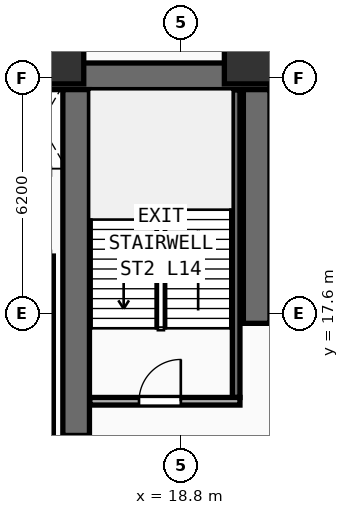
"""IFC4 building model, lengths in metres.
Left out: names, types, materials, properties, quantities, classifications, styles, units other than length and angle.
Written with IfcOpenShell. Run it as: python <this file> out.ifc"""

import sys

from ifc_helpers import new_model, si_unit, direction, frame, frame_2d, origin, origin_2d, place, context, subcontext, project, spatial, rectangle, extrude, element, fill, save


model = new_model("IFC4")
c1 = context("Model", 3, precision=1e-05, world=origin(), true_north=direction((0.0, 1.0)))
c2 = subcontext(c1, "Body", "Model", "MODEL_VIEW")
j1 = project(units=[si_unit("LENGTHUNIT", "METRE"), si_unit("PLANEANGLEUNIT", "RADIAN")], contexts=[c1])
p1 = place(None, origin())
s1 = spatial("IfcSite", under=j1, at=p1, CompositionType="ELEMENT")
p2 = place(p1, origin())
s2 = spatial("IfcBuilding", under=s1, at=p2, CompositionType="ELEMENT")
p3 = place(p2, frame((0.0, 0.0, 56.2)))
s3 = spatial("IfcBuildingStorey", under=s2, at=p3, CompositionType="ELEMENT", Elevation=56.2)
p4 = place(p3, frame((7.1, 23.85, 0.0), z_axis=(0.0, 0.0, 1.0), x_axis=(1.0, 0.0, 0.0)))
e1 = element("IfcWall", 1, at=p4, inside=s3, PredefinedType="SHEAR", context=c2, shape_type="SweptSolid", body=[
    extrude(rectangle(XDim=14.05, YDim=0.7, at=frame_2d((7.025, 0.0))), origin(), (0.0, 0.0, 1.0), 3.54),
])
p5 = place(p3, frame((20.8, 17.35, 0.0), z_axis=(0.0, 0.0, 1.0), x_axis=(0.0, 1.0, 0.0)))
e2 = element("IfcWall", 2, at=p5, inside=s3, PredefinedType="SHEAR", context=c2, shape_type="SweptSolid", body=[
    extrude(rectangle(XDim=6.15, YDim=0.7, at=frame_2d((3.075, 0.0))), origin(), (0.0, 0.0, 1.0), 3.54),
])
p6 = place(p3, frame((16.05, 14.4, 0.0), z_axis=(0.0, 0.0, 1.0), x_axis=(0.0, 1.0, 0.0)))
e3 = element("IfcWall", 3, at=p6, inside=s3, PredefinedType="SHEAR", context=c2, shape_type="SweptSolid", body=[
    extrude(rectangle(XDim=9.1, YDim=0.7, at=frame_2d((4.55, 0.0))), origin(), (0.0, 0.0, 1.0), 3.54),
])
for number, where, z_axis, x_axis in (
    (4, (15.45, 24.45, 0.0), (0.0, 0.0, 1.0), (1.0, 0.0, 0.0)),
    (5, (20.75, 24.45, 0.0), (0.0, 0.0, 1.0), (1.0, 0.0, 0.0)),
):
    element("IfcColumn", number, at=place(p3, frame(where, z_axis=z_axis, x_axis=x_axis)), inside=s3, PredefinedType="COLUMN", context=c2, shape_type="SweptSolid", body=[
        extrude(rectangle(XDim=1.6, YDim=1.6, at=origin_2d()), origin(), (0.0, 0.0, 1.0), 3.54),
    ])
p7 = place(p3, frame((20.26, 15.4, 0.0), z_axis=(0.0, 0.0, 1.0), x_axis=(0.0, 1.0, 0.0)))
e6 = element("IfcWall", 6, at=p7, inside=s3, PredefinedType="SHEAR", context=c2, shape_type="SweptSolid", body=[
    extrude(rectangle(XDim=8.09, YDim=0.2, at=frame_2d((4.045, 0.0))), origin(), (0.0, 0.0, 1.0), 3.54),
])
p8 = place(p3, frame((16.41, 15.3, 0.0), z_axis=(0.0, 0.0, 1.0), x_axis=(1.0, 0.0, 0.0)))
e7 = element("IfcWall", 7, at=p8, inside=s3, PredefinedType="PARTITIONING", context=c2, shape_type="SweptSolid", body=[
    extrude(rectangle(XDim=3.95, YDim=0.2, at=frame_2d((1.975, 0.0))), origin(), (0.0, 0.0, 1.0), 3.54),
])
p9 = place(p8, frame((1.294, 0.0, 0.0)))
e8 = element("IfcOpeningElement", 8, at=p9, cuts=e7, PredefinedType="OPENING", context=c2, shape_type="SweptSolid", body=[
    extrude(rectangle(XDim=1.1, YDim=2.2, at=frame_2d((0.55, 1.1))), frame((0.0, 0.11, 0.0), z_axis=(0.0, -1.0, 0.0), x_axis=(1.0, 0.0, 0.0)), (0.0, 0.0, 1.0), 0.22),
])
p10 = place(p3, frame((15.35, 14.22, 0.0), z_axis=(0.0, 0.0, 1.0), x_axis=(0.0, 1.0, 0.0)))
e9 = element("IfcWall", 9, at=p10, inside=s3, PredefinedType="PARTITIONING", context=c2, shape_type="SweptSolid", body=[
    extrude(rectangle(XDim=2.23, YDim=0.2, at=frame_2d((1.115, 0.0))), origin(), (0.0, 0.0, 1.0), 3.54),
])
p11 = place(p3, frame((15.35, 16.45, 0.0), z_axis=(0.0, 0.0, 1.0), x_axis=(0.0, 1.0, 0.0)))
e10 = element("IfcWall", 10, at=p11, inside=s3, PredefinedType="PARTITIONING", context=c2, shape_type="SweptSolid", body=[
    extrude(rectangle(XDim=2.67, YDim=0.2, at=frame_2d((1.335, 0.0))), origin(), (0.0, 0.0, 1.0), 3.54),
])
p12 = place(p9, origin())
e11 = element("IfcDoor", 11, at=p12, inside=s3, OperationType="SINGLE_SWING_RIGHT", PredefinedType="DOOR", context=c2, shape_type="SweptSolid", body=[
    extrude(rectangle(XDim=1.1, YDim=2.2, at=frame_2d((0.55, 1.1))), frame((0.0, 0.025, 0.0), z_axis=(0.0, -1.0, 0.0), x_axis=(1.0, 0.0, 0.0)), (0.0, 0.0, 1.0), 0.05),
])
fill(e8, e11)
save(model, sys.argv[1])
